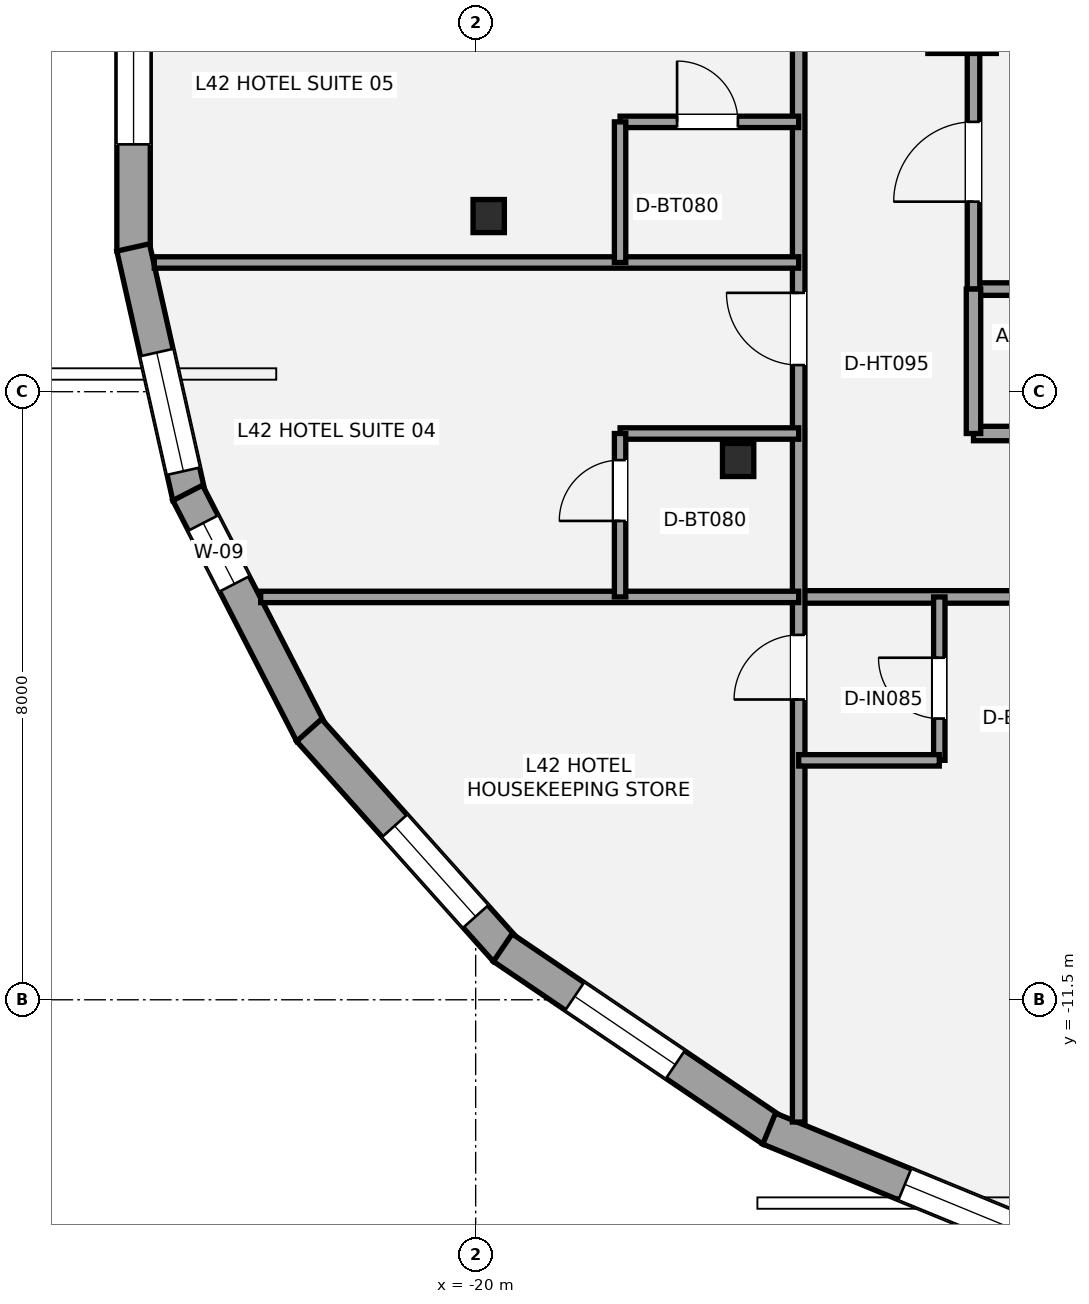
"""IFC4 building model, lengths in metres.
Left out: names, types, materials, properties, quantities, classifications, styles, units other than length and angle.
Written with IfcOpenShell. Run it as: python <this file> out.ifc"""

import sys

from ifc_helpers import new_model, si_unit, direction, frame, frame_2d, origin, origin_2d, place, context, subcontext, project, spatial, rectangle, i_section, extrude, element, fill, save


model = new_model("IFC4")
c1 = context("Model", 3, precision=1e-05, world=origin(), true_north=direction((0.0, 1.0)))
c2 = subcontext(c1, "Body", "Model", "MODEL_VIEW")
j1 = project(units=[si_unit("LENGTHUNIT", "METRE"), si_unit("PLANEANGLEUNIT", "RADIAN")], contexts=[c1])
p1 = place(None, origin())
s1 = spatial("IfcSite", under=j1, at=p1, CompositionType="ELEMENT")
p2 = place(p1, origin())
s2 = spatial("IfcBuilding", under=s1, at=p2, CompositionType="ELEMENT")
p3 = place(p2, frame((0.0, 0.0, 156.6)))
s3 = spatial("IfcBuildingStorey", under=s2, at=p3, CompositionType="ELEMENT", Elevation=156.6)
p4 = place(p3, frame((-13.6, 1.4, 0.0), z_axis=(0.0, 0.0, 1.0), x_axis=(1.0, 0.0, 0.0)))
e1 = element("IfcColumn", 1, at=p4, inside=s3, PredefinedType="COLUMN", context=c2, shape_type="SweptSolid", body=[
    extrude(rectangle(XDim=0.9, YDim=0.9, at=origin_2d()), origin(), (0.0, 0.0, 1.0), 3.2),
])
for number, where, z_axis, x_axis in (
    (2, (-19.828, -1.189, 0.0), (0.0, 0.0, 1.0), (1.0, 0.0, 0.0)),
    (3, (-16.547, -4.398, 0.0), (0.0, 0.0, 1.0), (1.0, 0.0, 0.0)),
):
    element("IfcColumn", number, at=place(p3, frame(where, z_axis=z_axis, x_axis=x_axis)), inside=s3, PredefinedType="COLUMN", context=c2, shape_type="SweptSolid", body=[
        extrude(i_section(OverallWidth=0.412, OverallDepth=0.435, WebThickness=0.036, FlangeThickness=0.057, at=origin_2d()), origin(), (0.0, 0.0, 1.0), 3.2),
    ])
p5 = place(p3, frame((-24.501, -1.65, 0.0), z_axis=(0.0, 0.0, 1.0), x_axis=(0.0, 1.0, 0.0)))
e4 = element("IfcWall", 4, at=p5, inside=s3, PredefinedType="STANDARD", context=c2, shape_type="SweptSolid", body=[
    extrude(rectangle(XDim=3.301, YDim=0.44, at=frame_2d((1.65, 0.0))), origin(), (0.0, 0.0, 1.0), 2.315),
])
p6 = place(p5, frame((1.405, 0.0, 0.58)))
e5 = element("IfcOpeningElement", 5, at=p6, cuts=e4, PredefinedType="OPENING", context=c2, shape_type="SweptSolid", body=[
    extrude(rectangle(XDim=1.6, YDim=1.55, at=frame_2d((0.8, 0.775))), frame((0.0, 0.23, 0.0), z_axis=(0.0, -1.0, 0.0), x_axis=(1.0, 0.0, 0.0)), (0.0, 0.0, 1.0), 0.46),
])
p7 = place(p3, frame((-23.77, -4.884, 0.0), z_axis=(0.0, 0.0, 1.0), x_axis=(-0.219028468724, 0.97571846856, 0.0)))
e6 = element("IfcWall", 6, at=p7, inside=s3, PredefinedType="STANDARD", context=c2, shape_type="SweptSolid", body=[
    extrude(rectangle(XDim=3.363, YDim=0.44, at=frame_2d((1.681, 0.0))), origin(), (0.0, 0.0, 1.0), 2.315),
])
p8 = place(p7, frame((0.346, 0.0, 0.58)))
e7 = element("IfcOpeningElement", 7, at=p8, cuts=e6, PredefinedType="OPENING", context=c2, shape_type="SweptSolid", body=[
    extrude(rectangle(XDim=1.6, YDim=1.55, at=frame_2d((0.8, 0.775))), frame((0.0, 0.23, 0.0), z_axis=(0.0, -1.0, 0.0), x_axis=(1.0, 0.0, 0.0)), (0.0, 0.0, 1.0), 0.46),
])
p9 = place(p3, frame((-22.159, -7.999, 0.0), z_axis=(0.0, 0.0, 1.0), x_axis=(-0.457409955052, 0.889255943483, 0.0)))
e8 = element("IfcWall", 8, at=p9, inside=s3, PredefinedType="STANDARD", context=c2, shape_type="SweptSolid", body=[
    extrude(rectangle(XDim=3.562, YDim=0.44, at=frame_2d((1.781, 0.0))), origin(), (0.0, 0.0, 1.0), 2.315),
])
p10 = place(p9, frame((2.216, 0.0, 0.58)))
e9 = element("IfcOpeningElement", 9, at=p10, cuts=e8, PredefinedType="OPENING", context=c2, shape_type="SweptSolid", body=[
    extrude(rectangle(XDim=0.9, YDim=1.35, at=frame_2d((0.45, 0.675))), frame((0.0, 0.23, 0.0), z_axis=(0.0, -1.0, 0.0), x_axis=(1.0, 0.0, 0.0)), (0.0, 0.0, 1.0), 0.46),
])
p11 = place(p3, frame((-19.603, -10.85, 0.0), z_axis=(0.0, 0.0, 1.0), x_axis=(-0.666335444554, 0.745652114147, 0.0)))
e10 = element("IfcWall", 10, at=p11, inside=s3, PredefinedType="STANDARD", context=c2, shape_type="SweptSolid", body=[
    extrude(rectangle(XDim=3.885, YDim=0.44, at=frame_2d((1.942, 0.0))), origin(), (0.0, 0.0, 1.0), 2.315),
])
p12 = place(p11, frame((0.597, 0.0, 0.58)))
e11 = element("IfcOpeningElement", 11, at=p12, cuts=e10, PredefinedType="OPENING", context=c2, shape_type="SweptSolid", body=[
    extrude(rectangle(XDim=1.6, YDim=1.55, at=frame_2d((0.8, 0.775))), frame((0.0, 0.23, 0.0), z_axis=(0.0, -1.0, 0.0), x_axis=(1.0, 0.0, 0.0)), (0.0, 0.0, 1.0), 0.46),
])
p13 = place(p3, frame((-16.099, -13.217, 0.0), z_axis=(0.0, 0.0, 1.0), x_axis=(-0.827771778383, 0.561064954272, 0.0)))
e12 = element("IfcWall", 12, at=p13, inside=s3, PredefinedType="STANDARD", context=c2, shape_type="SweptSolid", body=[
    extrude(rectangle(XDim=4.282, YDim=0.44, at=frame_2d((2.141, 0.0))), origin(), (0.0, 0.0, 1.0), 2.315),
])
p14 = place(p13, frame((1.54, 0.0, 0.58)))
e13 = element("IfcOpeningElement", 13, at=p14, cuts=e12, PredefinedType="OPENING", context=c2, shape_type="SweptSolid", body=[
    extrude(rectangle(XDim=1.6, YDim=1.55, at=frame_2d((0.8, 0.775))), frame((0.0, 0.23, 0.0), z_axis=(0.0, -1.0, 0.0), x_axis=(1.0, 0.0, 0.0)), (0.0, 0.0, 1.0), 0.46),
])
p15 = place(p3, frame((-11.865, -14.95, 0.0), z_axis=(0.0, 0.0, 1.0), x_axis=(-0.925044361302, 0.3798590918, 0.0)))
e14 = element("IfcWall", 14, at=p15, inside=s3, PredefinedType="STANDARD", context=c2, shape_type="SweptSolid", body=[
    extrude(rectangle(XDim=4.619, YDim=0.44, at=frame_2d((2.31, 0.0))), origin(), (0.0, 0.0, 1.0), 2.315),
])
p16 = place(p15, frame((1.09, 0.0, 0.58)))
e15 = element("IfcOpeningElement", 15, at=p16, cuts=e14, PredefinedType="OPENING", context=c2, shape_type="SweptSolid", body=[
    extrude(rectangle(XDim=1.6, YDim=1.55, at=frame_2d((0.8, 0.775))), frame((0.0, 0.23, 0.0), z_axis=(0.0, -1.0, 0.0), x_axis=(1.0, 0.0, 0.0)), (0.0, 0.0, 1.0), 0.46),
])
p17 = place(p3, frame((-13.45, -2.15, 0.0), z_axis=(0.0, 0.0, 1.0), x_axis=(1.0, 0.0, 0.0)))
e16 = element("IfcWall", 16, at=p17, inside=s3, PredefinedType="PARTITIONING", context=c2, shape_type="SweptSolid", body=[
    extrude(rectangle(XDim=6.25, YDim=0.165, at=frame_2d((3.125, 0.0))), origin(), (0.0, 0.0, 1.0), 3.02),
])
p18 = place(p3, frame((-13.45, -2.15, 0.0), z_axis=(0.0, 0.0, 1.0), x_axis=(0.0, 1.0, 0.0)))
e17 = element("IfcWall", 17, at=p18, inside=s3, PredefinedType="PARTITIONING", context=c2, shape_type="SweptSolid", body=[
    extrude(rectangle(XDim=3.4, YDim=0.165, at=frame_2d((1.7, 0.0))), origin(), (0.0, 0.0, 1.0), 2.473),
])
p19 = place(p18, frame((1.15, 0.0, 0.0)))
e18 = element("IfcOpeningElement", 18, at=p19, cuts=e17, PredefinedType="OPENING", context=c2, shape_type="SweptSolid", body=[
    extrude(rectangle(XDim=1.05, YDim=2.15, at=frame_2d((0.525, 1.075))), frame((0.0, 0.093, 0.0), z_axis=(0.0, -1.0, 0.0), x_axis=(1.0, 0.0, 0.0)), (0.0, 0.0, 1.0), 0.185),
])
p20 = place(p3, frame((-13.45, -4.05, 0.0), z_axis=(0.0, 0.0, 1.0), x_axis=(1.0, 0.0, 0.0)))
e19 = element("IfcWall", 19, at=p20, inside=s3, PredefinedType="PLUMBINGWALL", context=c2, shape_type="SweptSolid", body=[
    extrude(rectangle(XDim=11.35, YDim=0.19, at=frame_2d((5.675, 0.0))), origin(), (0.0, 0.0, 1.0), 2.555),
])
p21 = place(p20, frame((1.25, 0.0, 0.0)))
e20 = element("IfcOpeningElement", 20, at=p21, cuts=e19, PredefinedType="OPENING", context=c2, shape_type="SweptSolid", body=[
    extrude(rectangle(XDim=0.95, YDim=2.15, at=frame_2d((0.475, 1.075))), frame((0.0, 0.105, 0.0), z_axis=(0.0, -1.0, 0.0), x_axis=(1.0, 0.0, 0.0)), (0.0, 0.0, 1.0), 0.21),
])
p22 = place(p20, frame((6.4, 0.0, 0.0)))
e21 = element("IfcOpeningElement", 21, at=p22, cuts=e19, PredefinedType="OPENING", context=c2, shape_type="SweptSolid", body=[
    extrude(rectangle(XDim=0.9, YDim=2.1, at=frame_2d((0.45, 1.05))), frame((0.0, 0.105, 0.0), z_axis=(0.0, -1.0, 0.0), x_axis=(1.0, 0.0, 0.0)), (0.0, 0.0, 1.0), 0.21),
])
p23 = place(p3, frame((-13.45, -4.05, 0.0), z_axis=(0.0, 0.0, 1.0), x_axis=(0.0, 1.0, 0.0)))
e22 = element("IfcWall", 22, at=p23, inside=s3, PredefinedType="PLUMBINGWALL", context=c2, shape_type="SweptSolid", body=[
    extrude(rectangle(XDim=1.9, YDim=0.19, at=frame_2d((0.95, 0.0))), origin(), (0.0, 0.0, 1.0), 3.02),
])
p24 = place(p3, frame((-15.75, -6.2, 0.0), z_axis=(0.0, 0.0, 1.0), x_axis=(1.0, 0.0, 0.0)))
e23 = element("IfcWall", 23, at=p24, inside=s3, PredefinedType="PARTITIONING", context=c2, shape_type="SweptSolid", body=[
    extrude(rectangle(XDim=31.3, YDim=0.165, at=frame_2d((15.65, 0.0))), origin(), (0.0, 0.0, 1.0), 2.398),
])
p25 = place(p24, frame((8.12, 0.0, 0.0)))
e24 = element("IfcOpeningElement", 24, at=p25, cuts=e23, PredefinedType="OPENING", context=c2, shape_type="SweptSolid", body=[
    extrude(rectangle(XDim=0.95, YDim=2.15, at=frame_2d((0.475, 1.075))), frame((0.0, 0.093, 0.0), z_axis=(0.0, -1.0, 0.0), x_axis=(1.0, 0.0, 0.0)), (0.0, 0.0, 1.0), 0.185),
])
p26 = place(p24, frame((19.6, 0.0, 0.0)))
e25 = element("IfcOpeningElement", 25, at=p26, cuts=e23, PredefinedType="OPENING", context=c2, shape_type="SweptSolid", body=[
    extrude(rectangle(XDim=0.95, YDim=2.15, at=frame_2d((0.475, 1.075))), frame((0.0, 0.093, 0.0), z_axis=(0.0, -1.0, 0.0), x_axis=(1.0, 0.0, 0.0)), (0.0, 0.0, 1.0), 0.185),
])
p27 = place(p24, frame((29.95, 0.0, 0.0)))
e26 = element("IfcOpeningElement", 26, at=p27, cuts=e23, PredefinedType="OPENING", context=c2, shape_type="SweptSolid", body=[
    extrude(rectangle(XDim=0.95, YDim=2.15, at=frame_2d((0.475, 1.075))), frame((0.0, 0.093, 0.0), z_axis=(0.0, -1.0, 0.0), x_axis=(1.0, 0.0, 0.0)), (0.0, 0.0, 1.0), 0.185),
])
p28 = place(p3, frame((-15.75, -13.108, 0.0), z_axis=(0.0, 0.0, 1.0), x_axis=(0.0, 1.0, 0.0)))
e27 = element("IfcWall", 27, at=p28, inside=s3, PredefinedType="PARTITIONING", context=c2, shape_type="SweptSolid", body=[
    extrude(rectangle(XDim=20.658, YDim=0.165, at=frame_2d((10.329, 0.0))), origin(), (0.0, 0.0, 1.0), 2.473),
])
p29 = place(p28, frame((5.559, 0.0, 0.0)))
e28 = element("IfcOpeningElement", 28, at=p29, cuts=e27, PredefinedType="OPENING", context=c2, shape_type="SweptSolid", body=[
    extrude(rectangle(XDim=0.85, YDim=2.1, at=frame_2d((0.425, 1.05))), frame((0.0, 0.093, 0.0), z_axis=(0.0, -1.0, 0.0), x_axis=(1.0, 0.0, 0.0)), (0.0, 0.0, 1.0), 0.185),
])
p30 = place(p28, frame((9.959, 0.0, 0.0)))
e29 = element("IfcOpeningElement", 29, at=p30, cuts=e27, PredefinedType="OPENING", context=c2, shape_type="SweptSolid", body=[
    extrude(rectangle(XDim=0.95, YDim=2.15, at=frame_2d((0.475, 1.075))), frame((0.0, 0.093, 0.0), z_axis=(0.0, -1.0, 0.0), x_axis=(1.0, 0.0, 0.0)), (0.0, 0.0, 1.0), 0.185),
])
p31 = place(p28, frame((14.559, 0.0, 0.0)))
e30 = element("IfcOpeningElement", 30, at=p31, cuts=e27, PredefinedType="OPENING", context=c2, shape_type="SweptSolid", body=[
    extrude(rectangle(XDim=0.95, YDim=2.15, at=frame_2d((0.475, 1.075))), frame((0.0, 0.093, 0.0), z_axis=(0.0, -1.0, 0.0), x_axis=(1.0, 0.0, 0.0)), (0.0, 0.0, 1.0), 0.185),
])
p32 = place(p28, frame((19.309, 0.0, 0.0)))
e31 = element("IfcOpeningElement", 31, at=p32, cuts=e27, PredefinedType="OPENING", context=c2, shape_type="SweptSolid", body=[
    extrude(rectangle(XDim=0.95, YDim=2.15, at=frame_2d((0.475, 1.075))), frame((0.0, 0.093, 0.0), z_axis=(0.0, -1.0, 0.0), x_axis=(1.0, 0.0, 0.0)), (0.0, 0.0, 1.0), 0.185),
])
p33 = place(p3, frame((-22.828, -6.2, 0.0), z_axis=(0.0, 0.0, 1.0), x_axis=(1.0, 0.0, 0.0)))
e32 = element("IfcWall", 32, at=p33, inside=s3, PredefinedType="PLUMBINGWALL", context=c2, shape_type="SweptSolid", body=[
    extrude(rectangle(XDim=7.078, YDim=0.15, at=frame_2d((3.539, 0.0))), origin(), (0.0, 0.0, 1.0), 2.473),
])
p34 = place(p3, frame((-13.9, -8.35, 0.0), z_axis=(0.0, 0.0, 1.0), x_axis=(0.0, 1.0, 0.0)))
e33 = element("IfcWall", 33, at=p34, inside=s3, PredefinedType="PLUMBINGWALL", context=c2, shape_type="SweptSolid", body=[
    extrude(rectangle(XDim=2.15, YDim=0.15, at=frame_2d((1.075, 0.0))), origin(), (0.0, 0.0, 1.0), 3.02),
])
p35 = place(p34, frame((0.55, 0.0, 0.0)))
e34 = element("IfcOpeningElement", 34, at=p35, cuts=e33, PredefinedType="OPENING", context=c2, shape_type="SweptSolid", body=[
    extrude(rectangle(XDim=0.8, YDim=2.1, at=frame_2d((0.4, 1.05))), frame((0.0, 0.085, 0.0), z_axis=(0.0, -1.0, 0.0), x_axis=(1.0, 0.0, 0.0)), (0.0, 0.0, 1.0), 0.17),
])
p36 = place(p3, frame((-15.75, -8.35, 0.0), z_axis=(0.0, 0.0, 1.0), x_axis=(1.0, 0.0, 0.0)))
e35 = element("IfcWall", 35, at=p36, inside=s3, PredefinedType="PLUMBINGWALL", context=c2, shape_type="SweptSolid", body=[
    extrude(rectangle(XDim=1.85, YDim=0.15, at=frame_2d((0.925, 0.0))), origin(), (0.0, 0.0, 1.0), 2.473),
])
p37 = place(p3, frame((-24.228, -1.8, 0.0), z_axis=(0.0, 0.0, 1.0), x_axis=(1.0, 0.0, 0.0)))
e36 = element("IfcWall", 36, at=p37, inside=s3, PredefinedType="PLUMBINGWALL", context=c2, shape_type="SweptSolid", body=[
    extrude(rectangle(XDim=8.478, YDim=0.15, at=frame_2d((4.239, 0.0))), origin(), (0.0, 0.0, 1.0), 2.398),
])
p38 = place(p3, frame((-18.1, -4.05, 0.0), z_axis=(0.0, 0.0, 1.0), x_axis=(1.0, 0.0, 0.0)))
e37 = element("IfcWall", 37, at=p38, inside=s3, PredefinedType="PLUMBINGWALL", context=c2, shape_type="SweptSolid", body=[
    extrude(rectangle(XDim=2.35, YDim=0.15, at=frame_2d((1.175, 0.0))), origin(), (0.0, 0.0, 1.0), 2.398),
])
p39 = place(p3, frame((-18.1, -6.2, 0.0), z_axis=(0.0, 0.0, 1.0), x_axis=(0.0, 1.0, 0.0)))
e38 = element("IfcWall", 38, at=p39, inside=s3, PredefinedType="PLUMBINGWALL", context=c2, shape_type="SweptSolid", body=[
    extrude(rectangle(XDim=2.15, YDim=0.15, at=frame_2d((1.075, 0.0))), origin(), (0.0, 0.0, 1.0), 2.473),
])
p40 = place(p39, frame((1.0, 0.0, 0.0)))
e39 = element("IfcOpeningElement", 39, at=p40, cuts=e38, PredefinedType="OPENING", context=c2, shape_type="SweptSolid", body=[
    extrude(rectangle(XDim=0.8, YDim=2.1, at=frame_2d((0.4, 1.05))), frame((0.0, 0.085, 0.0), z_axis=(0.0, -1.0, 0.0), x_axis=(1.0, 0.0, 0.0)), (0.0, 0.0, 1.0), 0.17),
])
p41 = place(p3, frame((-18.1, 0.05, 0.0), z_axis=(0.0, 0.0, 1.0), x_axis=(1.0, 0.0, 0.0)))
e40 = element("IfcWall", 40, at=p41, inside=s3, PredefinedType="PLUMBINGWALL", context=c2, shape_type="SweptSolid", body=[
    extrude(rectangle(XDim=2.35, YDim=0.15, at=frame_2d((1.175, 0.0))), origin(), (0.0, 0.0, 1.0), 2.473),
])
p42 = place(p41, frame((0.75, 0.0, 0.0)))
e41 = element("IfcOpeningElement", 41, at=p42, cuts=e40, PredefinedType="OPENING", context=c2, shape_type="SweptSolid", body=[
    extrude(rectangle(XDim=0.8, YDim=2.1, at=frame_2d((0.4, 1.05))), frame((0.0, 0.085, 0.0), z_axis=(0.0, -1.0, 0.0), x_axis=(1.0, 0.0, 0.0)), (0.0, 0.0, 1.0), 0.17),
])
p43 = place(p3, frame((-18.1, -1.8, 0.0), z_axis=(0.0, 0.0, 1.0), x_axis=(0.0, 1.0, 0.0)))
e42 = element("IfcWall", 42, at=p43, inside=s3, PredefinedType="PLUMBINGWALL", context=c2, shape_type="SweptSolid", body=[
    extrude(rectangle(XDim=1.85, YDim=0.15, at=frame_2d((0.925, 0.0))), origin(), (0.0, 0.0, 1.0), 2.473),
])
p44 = place(p6, origin())
e43 = element("IfcWindow", 43, at=p44, inside=s3, PartitioningType="SINGLE_PANEL", PredefinedType="WINDOW", context=c2, shape_type="SweptSolid", body=[
    extrude(rectangle(XDim=1.6, YDim=1.55, at=frame_2d((0.8, 0.775))), frame((0.0, -0.01, 0.0), z_axis=(0.0, -1.0, 0.0), x_axis=(1.0, 0.0, 0.0)), (0.0, 0.0, 1.0), 0.06),
])
fill(e5, e43)
p45 = place(p8, origin())
e44 = element("IfcWindow", 44, at=p45, inside=s3, PartitioningType="SINGLE_PANEL", PredefinedType="WINDOW", context=c2, shape_type="SweptSolid", body=[
    extrude(rectangle(XDim=1.6, YDim=1.55, at=frame_2d((0.8, 0.775))), frame((0.0, -0.01, 0.0), z_axis=(0.0, -1.0, 0.0), x_axis=(1.0, 0.0, 0.0)), (0.0, 0.0, 1.0), 0.06),
])
fill(e7, e44)
p46 = place(p10, origin())
e45 = element("IfcWindow", 45, at=p46, inside=s3, PartitioningType="SINGLE_PANEL", PredefinedType="WINDOW", context=c2, shape_type="SweptSolid", body=[
    extrude(rectangle(XDim=0.9, YDim=1.35, at=frame_2d((0.45, 0.675))), frame((0.0, -0.01, 0.0), z_axis=(0.0, -1.0, 0.0), x_axis=(1.0, 0.0, 0.0)), (0.0, 0.0, 1.0), 0.06),
])
fill(e9, e45)
p47 = place(p12, origin())
e46 = element("IfcWindow", 46, at=p47, inside=s3, PartitioningType="SINGLE_PANEL", PredefinedType="WINDOW", context=c2, shape_type="SweptSolid", body=[
    extrude(rectangle(XDim=1.6, YDim=1.55, at=frame_2d((0.8, 0.775))), frame((0.0, -0.01, 0.0), z_axis=(0.0, -1.0, 0.0), x_axis=(1.0, 0.0, 0.0)), (0.0, 0.0, 1.0), 0.06),
])
fill(e11, e46)
p48 = place(p14, origin())
e47 = element("IfcWindow", 47, at=p48, inside=s3, PartitioningType="SINGLE_PANEL", PredefinedType="WINDOW", context=c2, shape_type="SweptSolid", body=[
    extrude(rectangle(XDim=1.6, YDim=1.55, at=frame_2d((0.8, 0.775))), frame((0.0, -0.01, 0.0), z_axis=(0.0, -1.0, 0.0), x_axis=(1.0, 0.0, 0.0)), (0.0, 0.0, 1.0), 0.06),
])
fill(e13, e47)
p49 = place(p16, origin())
e48 = element("IfcWindow", 48, at=p49, inside=s3, PartitioningType="SINGLE_PANEL", PredefinedType="WINDOW", context=c2, shape_type="SweptSolid", body=[
    extrude(rectangle(XDim=1.6, YDim=1.55, at=frame_2d((0.8, 0.775))), frame((0.0, -0.01, 0.0), z_axis=(0.0, -1.0, 0.0), x_axis=(1.0, 0.0, 0.0)), (0.0, 0.0, 1.0), 0.06),
])
fill(e15, e48)
p50 = place(p19, origin())
e49 = element("IfcDoor", 49, at=p50, inside=s3, OperationType="SINGLE_SWING_LEFT", PredefinedType="DOOR", context=c2, shape_type="SweptSolid", body=[
    extrude(rectangle(XDim=1.05, YDim=2.15, at=frame_2d((0.525, 1.075))), frame((0.0, 0.025, 0.0), z_axis=(0.0, -1.0, 0.0), x_axis=(1.0, 0.0, 0.0)), (0.0, 0.0, 1.0), 0.05),
])
fill(e18, e49)
p51 = place(p29, origin())
e50 = element("IfcDoor", 50, at=p51, inside=s3, OperationType="SINGLE_SWING_LEFT", PredefinedType="DOOR", context=c2, shape_type="SweptSolid", body=[
    extrude(rectangle(XDim=0.85, YDim=2.1, at=frame_2d((0.425, 1.05))), frame((0.0, 0.025, 0.0), z_axis=(0.0, -1.0, 0.0), x_axis=(1.0, 0.0, 0.0)), (0.0, 0.0, 1.0), 0.05),
])
fill(e28, e50)
p52 = place(p35, origin())
e51 = element("IfcDoor", 51, at=p52, inside=s3, OperationType="SINGLE_SWING_RIGHT", PredefinedType="DOOR", context=c2, shape_type="SweptSolid", body=[
    extrude(rectangle(XDim=0.8, YDim=2.1, at=frame_2d((0.4, 1.05))), frame((0.0, 0.025, 0.0), z_axis=(0.0, -1.0, 0.0), x_axis=(1.0, 0.0, 0.0)), (0.0, 0.0, 1.0), 0.05),
])
fill(e34, e51)
p53 = place(p30, origin())
e52 = element("IfcDoor", 52, at=p53, inside=s3, OperationType="SINGLE_SWING_RIGHT", PredefinedType="DOOR", context=c2, shape_type="SweptSolid", body=[
    extrude(rectangle(XDim=0.95, YDim=2.15, at=frame_2d((0.475, 1.075))), frame((0.0, 0.025, 0.0), z_axis=(0.0, -1.0, 0.0), x_axis=(1.0, 0.0, 0.0)), (0.0, 0.0, 1.0), 0.05),
])
fill(e29, e52)
p54 = place(p40, origin())
e53 = element("IfcDoor", 53, at=p54, inside=s3, OperationType="SINGLE_SWING_LEFT", PredefinedType="DOOR", context=c2, shape_type="SweptSolid", body=[
    extrude(rectangle(XDim=0.8, YDim=2.1, at=frame_2d((0.4, 1.05))), frame((0.0, 0.025, 0.0), z_axis=(0.0, -1.0, 0.0), x_axis=(1.0, 0.0, 0.0)), (0.0, 0.0, 1.0), 0.05),
])
fill(e39, e53)
p55 = place(p42, origin())
e54 = element("IfcDoor", 54, at=p55, inside=s3, OperationType="SINGLE_SWING_LEFT", PredefinedType="DOOR", context=c2, shape_type="SweptSolid", body=[
    extrude(rectangle(XDim=0.8, YDim=2.1, at=frame_2d((0.4, 1.05))), frame((0.0, 0.025, 0.0), z_axis=(0.0, -1.0, 0.0), x_axis=(1.0, 0.0, 0.0)), (0.0, 0.0, 1.0), 0.05),
])
fill(e41, e54)
save(model, sys.argv[1])
